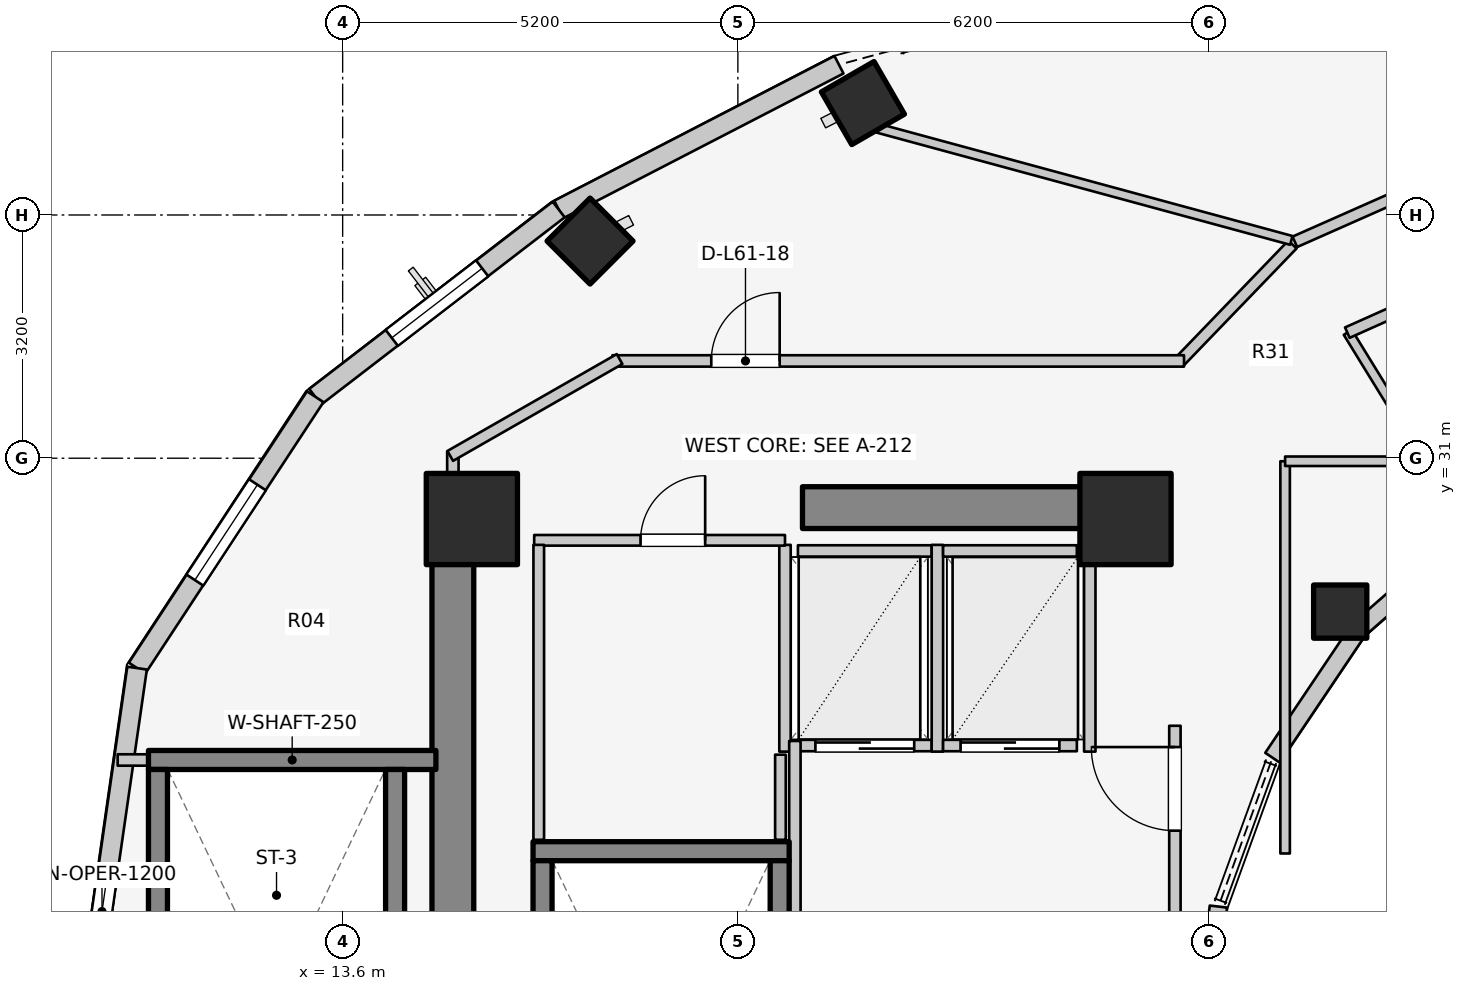
"""IFC4 building model, lengths in metres.
Left out: names, types, materials, properties, quantities, classifications, styles, units other than length and angle.
Written with IfcOpenShell. Run it as: python <this file> out.ifc"""

import sys

from ifc_helpers import new_model, si_unit, direction, frame, frame_2d, origin, origin_2d, place, context, subcontext, project, spatial, rectangle, extrude, element, fill, save


model = new_model("IFC4")
c1 = context("Model", 3, precision=1e-05, world=origin(), true_north=direction((0.0, 1.0)))
c2 = subcontext(c1, "Body", "Model", "MODEL_VIEW")
j1 = project(units=[si_unit("LENGTHUNIT", "METRE"), si_unit("PLANEANGLEUNIT", "RADIAN")], contexts=[c1])
p1 = place(None, origin())
s1 = spatial("IfcSite", under=j1, at=p1, CompositionType="ELEMENT")
p2 = place(p1, origin())
s2 = spatial("IfcBuilding", under=s1, at=p2, CompositionType="ELEMENT")
p3 = place(p2, frame((0.0, 0.0, 201.6)))
s3 = spatial("IfcBuildingStorey", under=s2, at=p3, CompositionType="ELEMENT", Elevation=201.6)
p4 = place(p3, frame((15.05, 17.05, 0.0), z_axis=(0.0, 0.0, 1.0), x_axis=(0.0, 1.0, 0.0)))
e1 = element("IfcWall", 1, at=p4, inside=s3, PredefinedType="SHEAR", context=c2, shape_type="SweptSolid", body=[
    extrude(rectangle(XDim=12.8, YDim=0.55, at=frame_2d((6.4, 0.0))), origin(), (0.0, 0.0, 1.0), 3.1),
])
p5 = place(p3, frame((19.65, 30.35, 0.0), z_axis=(0.0, 0.0, 1.0), x_axis=(1.0, 0.0, 0.0)))
e2 = element("IfcWall", 2, at=p5, inside=s3, PredefinedType="SHEAR", context=c2, shape_type="SweptSolid", body=[
    extrude(rectangle(XDim=4.5, YDim=0.55, at=frame_2d((2.25, 0.0))), origin(), (0.0, 0.0, 1.0), 3.1),
])
p6 = place(p3, frame((16.105, 25.83, 0.0), z_axis=(0.0, 0.0, 1.0), x_axis=(1.0, 0.0, 0.0)))
e3 = element("IfcWall", 3, at=p6, inside=s3, PredefinedType="SOLIDWALL", context=c2, shape_type="SweptSolid", body=[
    extrude(rectangle(XDim=3.37, YDim=0.25, at=frame_2d((1.685, 0.0))), origin(), (0.0, 0.0, 1.0), 3.1),
])
for number, where, z_axis, x_axis in (
    (4, (16.23, 17.895, 0.0), (0.0, 0.0, 1.0), (0.0, 1.0, 0.0)),
    (5, (19.35, 17.895, 0.0), (0.0, 0.0, 1.0), (0.0, 1.0, 0.0)),
):
    element("IfcWall", number, at=place(p3, frame(where, z_axis=z_axis, x_axis=x_axis)), inside=s3, PredefinedType="SOLIDWALL", context=c2, shape_type="SweptSolid", body=[
        extrude(rectangle(XDim=7.81, YDim=0.25, at=frame_2d((3.905, 0.0))), origin(), (0.0, 0.0, 1.0), 3.1),
    ])
p7 = place(p3, frame((11.045, 27.03, 0.0), z_axis=(0.0, 0.0, 1.0), x_axis=(1.0, 0.0, 0.0)))
e6 = element("IfcWall", 6, at=p7, inside=s3, PredefinedType="SOLIDWALL", context=c2, shape_type="SweptSolid", body=[
    extrude(rectangle(XDim=3.782, YDim=0.25, at=frame_2d((1.891, 0.0))), origin(), (0.0, 0.0, 1.0), 3.1),
])
for number, where, z_axis, x_axis in (
    (7, (11.17, 19.095, 0.0), (0.0, 0.0, 1.0), (0.0, 1.0, 0.0)),
    (8, (14.29, 19.095, 0.0), (0.0, 0.0, 1.0), (0.0, 1.0, 0.0)),
):
    element("IfcWall", number, at=place(p3, frame(where, z_axis=z_axis, x_axis=x_axis)), inside=s3, PredefinedType="SOLIDWALL", context=c2, shape_type="SweptSolid", body=[
        extrude(rectangle(XDim=7.81, YDim=0.25, at=frame_2d((3.905, 0.0))), origin(), (0.0, 0.0, 1.0), 3.1),
    ])
for number, where, z_axis, x_axis in (
    (9, (23.9, 30.2, 0.0), (0.0, 0.0, 1.0), (1.0, 0.0, 0.0)),
    (10, (15.3, 30.2, 0.0), (0.0, 0.0, 1.0), (1.0, 0.0, 0.0)),
):
    element("IfcColumn", number, at=place(p3, frame(where, z_axis=z_axis, x_axis=x_axis)), inside=s3, PredefinedType="COLUMN", context=c2, shape_type="SweptSolid", body=[
        extrude(rectangle(XDim=1.2, YDim=1.2, at=origin_2d()), origin(), (0.0, 0.0, 1.0), 3.1),
    ])
p8 = place(p3, frame((20.445, 35.673, 0.0), z_axis=(0.0, 0.0, 1.0), x_axis=(-0.5, 0.866025403784, 0.0)))
e11 = element("IfcColumn", 11, at=p8, inside=s3, PredefinedType="COLUMN", context=c2, shape_type="SweptSolid", body=[
    extrude(rectangle(XDim=0.8, YDim=0.8, at=origin_2d()), origin(), (0.0, 0.0, 1.0), 3.1),
])
p9 = place(p3, frame((26.725, 28.982, 0.0), z_axis=(0.0, 0.0, 1.0), x_axis=(1.0, 0.0, 0.0)))
e12 = element("IfcColumn", 12, at=p9, inside=s3, PredefinedType="COLUMN", context=c2, shape_type="SweptSolid", body=[
    extrude(rectangle(XDim=0.7, YDim=0.7, at=origin_2d()), origin(), (0.0, 0.0, 1.0), 3.1),
])
p10 = place(p3, frame((16.855, 33.857, 0.0), z_axis=(0.0, 0.0, 1.0), x_axis=(-0.707106781187, 0.707106781187, 0.0)))
e13 = element("IfcColumn", 13, at=p10, inside=s3, PredefinedType="COLUMN", context=c2, shape_type="SweptSolid", body=[
    extrude(rectangle(XDim=0.8, YDim=0.8, at=origin_2d()), origin(), (0.0, 0.0, 1.0), 3.1),
])
p11 = place(p3, frame((28.44, 30.032, 0.0), z_axis=(0.0, 0.0, 1.0), x_axis=(-0.752576694707, -0.658504607869, 0.0)))
e14 = element("IfcWall", 14, at=p11, inside=s3, PredefinedType="STANDARD", context=c2, shape_type="SweptSolid", body=[
    extrude(rectangle(XDim=1.959, YDim=0.23, at=frame_2d((0.98, 0.0))), origin(), (0.0, 0.0, 1.0), 2.16),
])
p12 = place(p3, frame((26.965, 28.742, 0.0), z_axis=(0.0, 0.0, 1.0), x_axis=(-0.558197800898, -0.829707909492, 0.0)))
e15 = element("IfcWall", 15, at=p12, inside=s3, PredefinedType="STANDARD", context=c2, shape_type="SweptSolid", body=[
    extrude(rectangle(XDim=2.027, YDim=0.23, at=frame_2d((1.013, 0.0))), origin(), (0.0, 0.0, 1.0), 2.16),
])
p13 = place(p3, frame((25.123, 25.102, 0.0), z_axis=(0.0, 0.0, 1.0), x_axis=(-0.114711713601, -0.993398823617, 0.0)))
e16 = element("IfcWall", 16, at=p13, inside=s3, PredefinedType="STANDARD", context=c2, shape_type="SweptSolid", body=[
    extrude(rectangle(XDim=2.115, YDim=0.23, at=frame_2d((1.058, 0.0))), origin(), (0.0, 0.0, 1.0), 2.84),
])
p14 = place(p3, frame((20.13, 36.177, 0.0), z_axis=(0.0, 0.0, 1.0), x_axis=(-0.88849146803, -0.458893137057, 0.0)))
e17 = element("IfcWall", 17, at=p14, inside=s3, PredefinedType="STANDARD", context=c2, shape_type="SweptSolid", body=[
    extrude(rectangle(XDim=4.15, YDim=0.26, at=frame_2d((2.075, 0.0))), origin(), (0.0, 0.0, 1.0), 2.85),
])
p15 = place(p3, frame((16.442, 34.272, 0.0), z_axis=(0.0, 0.0, 1.0), x_axis=(-0.792713817907, -0.609593965603, 0.0)))
e18 = element("IfcWall", 18, at=p15, inside=s3, PredefinedType="STANDARD", context=c2, shape_type="SweptSolid", body=[
    extrude(rectangle(XDim=4.041, YDim=0.26, at=frame_2d((2.021, 0.0))), origin(), (0.0, 0.0, 1.0), 2.85),
])
p16 = place(p15, frame((1.271, 0.0, 0.75)))
e19 = element("IfcOpeningElement", 19, at=p16, cuts=e18, PredefinedType="OPENING", context=c2, shape_type="SweptSolid", body=[
    extrude(rectangle(XDim=1.5, YDim=1.6, at=frame_2d((0.75, 0.8))), frame((0.0, 0.14, 0.0), z_axis=(0.0, -1.0, 0.0), x_axis=(1.0, 0.0, 0.0)), (0.0, 0.0, 1.0), 0.28),
])
p17 = place(p3, frame((13.239, 31.809, 0.0), z_axis=(0.0, 0.0, 1.0), x_axis=(-0.548776305075, -0.835969238064, 0.0)))
e20 = element("IfcWall", 20, at=p17, inside=s3, PredefinedType="STANDARD", context=c2, shape_type="SweptSolid", body=[
    extrude(rectangle(XDim=4.271, YDim=0.26, at=frame_2d((2.135, 0.0))), origin(), (0.0, 0.0, 1.0), 2.85),
])
p18 = place(p17, frame((1.385, 0.0, 0.75)))
e21 = element("IfcOpeningElement", 21, at=p18, cuts=e20, PredefinedType="OPENING", context=c2, shape_type="SweptSolid", body=[
    extrude(rectangle(XDim=1.5, YDim=1.6, at=frame_2d((0.75, 0.8))), frame((0.0, 0.14, 0.0), z_axis=(0.0, -1.0, 0.0), x_axis=(1.0, 0.0, 0.0)), (0.0, 0.0, 1.0), 0.28),
])
p19 = place(p3, frame((10.895, 28.239, 0.0), z_axis=(0.0, 0.0, 1.0), x_axis=(-0.142712754019, -0.989764148593, 0.0)))
e22 = element("IfcWall", 22, at=p19, inside=s3, PredefinedType="STANDARD", context=c2, shape_type="SweptSolid", body=[
    extrude(rectangle(XDim=5.293, YDim=0.26, at=frame_2d((2.646, 0.0))), origin(), (0.0, 0.0, 1.0), 2.85),
])
p20 = place(p19, frame((2.635, 0.0, 0.75)))
e23 = element("IfcOpeningElement", 23, at=p20, cuts=e22, PredefinedType="OPENING", context=c2, shape_type="SweptSolid", body=[
    extrude(rectangle(XDim=1.2, YDim=1.5, at=frame_2d((0.6, 0.75))), frame((0.0, 0.14, 0.0), z_axis=(0.0, -1.0, 0.0), x_axis=(1.0, 0.0, 0.0)), (0.0, 0.0, 1.0), 0.28),
])
p21 = place(p3, frame((19.59, 27.22, 0.0), z_axis=(0.0, 0.0, 1.0), x_axis=(1.0, 0.0, 0.0)))
e24 = element("IfcWall", 24, at=p21, inside=s3, PredefinedType="SOLIDWALL", context=c2, shape_type="SweptSolid", body=[
    extrude(rectangle(XDim=1.76, YDim=0.15, at=frame_2d((0.88, 0.0))), origin(), (0.0, 0.0, 1.0), 2.855),
])
p22 = place(p21, frame((0.23, 0.0, 0.0)))
e25 = element("IfcOpeningElement", 25, at=p22, cuts=e24, PredefinedType="OPENING", context=c2, shape_type="SweptSolid", body=[
    extrude(rectangle(XDim=1.3, YDim=2.1, at=frame_2d((0.65, 1.05))), frame((0.0, 0.085, 0.0), z_axis=(0.0, -1.0, 0.0), x_axis=(1.0, 0.0, 0.0)), (0.0, 0.0, 1.0), 0.17),
])
p23 = place(p3, frame((19.59, 29.78, 0.0), z_axis=(0.0, 0.0, 1.0), x_axis=(1.0, 0.0, 0.0)))
e26 = element("IfcWall", 26, at=p23, inside=s3, PredefinedType="SOLIDWALL", context=c2, shape_type="SweptSolid", body=[
    extrude(rectangle(XDim=1.76, YDim=0.15, at=frame_2d((0.88, 0.0))), origin(), (0.0, 0.0, 1.0), 2.855),
])
for number, where, z_axis, x_axis in (
    (27, (19.42, 27.14, 0.0), (0.0, 0.0, 1.0), (0.0, 1.0, 0.0)),
    (28, (21.425, 27.14, 0.0), (0.0, 0.0, 1.0), (0.0, 1.0, 0.0)),
):
    element("IfcWall", number, at=place(p3, frame(where, z_axis=z_axis, x_axis=x_axis)), inside=s3, PredefinedType="SOLIDWALL", context=c2, shape_type="SweptSolid", body=[
        extrude(rectangle(XDim=2.72, YDim=0.15, at=frame_2d((1.36, 0.0))), origin(), (0.0, 0.0, 1.0), 2.855),
    ])
p24 = place(p3, frame((21.5, 27.22, 0.0), z_axis=(0.0, 0.0, 1.0), x_axis=(1.0, 0.0, 0.0)))
e29 = element("IfcWall", 29, at=p24, inside=s3, PredefinedType="SOLIDWALL", context=c2, shape_type="SweptSolid", body=[
    extrude(rectangle(XDim=1.76, YDim=0.15, at=frame_2d((0.88, 0.0))), origin(), (0.0, 0.0, 1.0), 2.855),
])
p25 = place(p24, frame((0.23, 0.0, 0.0)))
e30 = element("IfcOpeningElement", 30, at=p25, cuts=e29, PredefinedType="OPENING", context=c2, shape_type="SweptSolid", body=[
    extrude(rectangle(XDim=1.3, YDim=2.1, at=frame_2d((0.65, 1.05))), frame((0.0, 0.085, 0.0), z_axis=(0.0, -1.0, 0.0), x_axis=(1.0, 0.0, 0.0)), (0.0, 0.0, 1.0), 0.17),
])
p26 = place(p3, frame((21.5, 29.78, 0.0), z_axis=(0.0, 0.0, 1.0), x_axis=(1.0, 0.0, 0.0)))
e31 = element("IfcWall", 31, at=p26, inside=s3, PredefinedType="SOLIDWALL", context=c2, shape_type="SweptSolid", body=[
    extrude(rectangle(XDim=1.76, YDim=0.15, at=frame_2d((0.88, 0.0))), origin(), (0.0, 0.0, 1.0), 2.855),
])
p27 = place(p3, frame((23.43, 27.14, 0.0), z_axis=(0.0, 0.0, 1.0), x_axis=(0.0, 1.0, 0.0)))
e32 = element("IfcWall", 32, at=p27, inside=s3, PredefinedType="SOLIDWALL", context=c2, shape_type="SweptSolid", body=[
    extrude(rectangle(XDim=2.72, YDim=0.15, at=frame_2d((1.36, 0.0))), origin(), (0.0, 0.0, 1.0), 2.855),
])
p28 = place(p3, frame((19.55, 24.08, 0.0), z_axis=(0.0, 0.0, 1.0), x_axis=(0.0, 1.0, 0.0)))
e33 = element("IfcWall", 33, at=p28, inside=s3, PredefinedType="PARTITIONING", context=c2, shape_type="SweptSolid", body=[
    extrude(rectangle(XDim=3.2, YDim=0.15, at=frame_2d((1.6, 0.0))), origin(), (0.0, 0.0, 1.0), 2.855),
])
p29 = place(p3, frame((24.55, 24.08, 0.0), z_axis=(0.0, 0.0, 1.0), x_axis=(0.0, 1.0, 0.0)))
e34 = element("IfcWall", 34, at=p29, inside=s3, PredefinedType="PARTITIONING", context=c2, shape_type="SweptSolid", body=[
    extrude(rectangle(XDim=3.4, YDim=0.15, at=frame_2d((1.7, 0.0))), origin(), (0.0, 0.0, 1.0), 2.855),
])
p30 = place(p29, frame((2.02, 0.0, 0.0)))
e35 = element("IfcOpeningElement", 35, at=p30, cuts=e34, PredefinedType="OPENING", context=c2, shape_type="SweptSolid", body=[
    extrude(rectangle(XDim=1.1, YDim=2.1, at=frame_2d((0.55, 1.05))), frame((0.0, 0.085, 0.0), z_axis=(0.0, -1.0, 0.0), x_axis=(1.0, 0.0, 0.0)), (0.0, 0.0, 1.0), 0.17),
])
p31 = place(p3, frame((16.12, 29.92, 0.0), z_axis=(0.0, 0.0, 1.0), x_axis=(1.0, 0.0, 0.0)))
e36 = element("IfcWall", 36, at=p31, inside=s3, PredefinedType="PLUMBINGWALL", context=c2, shape_type="SweptSolid", body=[
    extrude(rectangle(XDim=3.3, YDim=0.14, at=frame_2d((1.65, 0.0))), origin(), (0.0, 0.0, 1.0), 2.855),
])
p32 = place(p31, frame((1.399, 0.0, 0.0)))
e37 = element("IfcOpeningElement", 37, at=p32, cuts=e36, PredefinedType="OPENING", context=c2, shape_type="SweptSolid", body=[
    extrude(rectangle(XDim=0.85, YDim=2.05, at=frame_2d((0.425, 1.025))), frame((0.0, 0.08, 0.0), z_axis=(0.0, -1.0, 0.0), x_axis=(1.0, 0.0, 0.0)), (0.0, 0.0, 1.0), 0.16),
])
p33 = place(p3, frame((16.18, 25.98, 0.0), z_axis=(0.0, 0.0, 1.0), x_axis=(0.0, 1.0, 0.0)))
e38 = element("IfcWall", 38, at=p33, inside=s3, PredefinedType="PLUMBINGWALL", context=c2, shape_type="SweptSolid", body=[
    extrude(rectangle(XDim=3.88, YDim=0.14, at=frame_2d((1.94, 0.0))), origin(), (0.0, 0.0, 1.0), 2.855),
])
p34 = place(p3, frame((19.36, 25.98, 0.0), z_axis=(0.0, 0.0, 1.0), x_axis=(0.0, 1.0, 0.0)))
e39 = element("IfcWall", 39, at=p34, inside=s3, PredefinedType="PLUMBINGWALL", context=c2, shape_type="SweptSolid", body=[
    extrude(rectangle(XDim=1.12, YDim=0.14, at=frame_2d((0.56, 0.0))), origin(), (0.0, 0.0, 1.0), 2.855),
])
p35 = place(p3, frame((28.45, 30.015, 0.0), z_axis=(0.0, 0.0, 1.0), x_axis=(-0.523992004803, 0.851723182086, 0.0)))
e40 = element("IfcWall", 40, at=p35, inside=s3, PredefinedType="PARTITIONING", context=c2, shape_type="SweptSolid", body=[
    extrude(rectangle(XDim=3.101, YDim=0.125, at=frame_2d((1.551, 0.0))), origin(), (0.0, 0.0, 1.0), 2.376),
])
p36 = place(p3, frame((29.323, 33.771, 0.0), z_axis=(0.0, 0.0, 1.0), x_axis=(-0.913120130558, -0.407690602257, 0.0)))
e41 = element("IfcWall", 41, at=p36, inside=s3, PredefinedType="PARTITIONING", context=c2, shape_type="SweptSolid", body=[
    extrude(rectangle(XDim=2.743, YDim=0.15, at=frame_2d((1.371, 0.0))), origin(), (0.0, 0.0, 1.0), 2.376),
])
p37 = place(p36, frame((0.896, 0.0, 0.0)))
e42 = element("IfcOpeningElement", 42, at=p37, cuts=e41, PredefinedType="OPENING", context=c2, shape_type="SweptSolid", body=[
    extrude(rectangle(XDim=0.95, YDim=2.1, at=frame_2d((0.475, 1.05))), frame((0.0, 0.085, 0.0), z_axis=(0.0, -1.0, 0.0), x_axis=(1.0, 0.0, 0.0)), (0.0, 0.0, 1.0), 0.17),
])
p38 = place(p3, frame((26.0, 25.8, 0.0), z_axis=(0.0, 0.0, 1.0), x_axis=(0.0, 1.0, 0.0)))
e43 = element("IfcWall", 43, at=p38, inside=s3, PredefinedType="PARTITIONING", context=c2, shape_type="SweptSolid", body=[
    extrude(rectangle(XDim=5.16, YDim=0.125, at=frame_2d((2.58, 0.0))), origin(), (0.0, 0.0, 1.0), 2.232),
])
p39 = place(p3, frame((26.0, 30.96, 0.0), z_axis=(0.0, 0.0, 1.0), x_axis=(1.0, 0.0, 0.0)))
e44 = element("IfcWall", 44, at=p39, inside=s3, PredefinedType="PARTITIONING", context=c2, shape_type="SweptSolid", body=[
    extrude(rectangle(XDim=2.6, YDim=0.125, at=frame_2d((1.3, 0.0))), origin(), (0.0, 0.0, 1.0), 2.376),
])
p40 = place(p3, frame((10.64, 27.03, 0.0), z_axis=(0.0, 0.0, 1.0), x_axis=(1.0, 0.0, 0.0)))
e45 = element("IfcWall", 45, at=p40, inside=s3, PredefinedType="PARTITIONING", context=c2, shape_type="SweptSolid", body=[
    extrude(rectangle(XDim=0.4, YDim=0.15, at=frame_2d((0.2, 0.0))), origin(), (0.0, 0.0, 1.0), 2.855),
])
p41 = place(p3, frame((15.05, 29.8, 0.0), z_axis=(0.0, 0.0, 1.0), x_axis=(0.0, 1.0, 0.0)))
e46 = element("IfcWall", 46, at=p41, inside=s3, PredefinedType="PARTITIONING", context=c2, shape_type="SweptSolid", body=[
    extrude(rectangle(XDim=1.29, YDim=0.15, at=frame_2d((0.645, 0.0))), origin(), (0.0, 0.0, 1.0), 2.855),
])
p42 = place(p3, frame((26.097, 33.812, 0.0), z_axis=(0.0, 0.0, 1.0), x_axis=(-0.694032962553, -0.719943224768, 0.0)))
e47 = element("IfcWall", 47, at=p42, inside=s3, PredefinedType="PARTITIONING", context=c2, shape_type="SweptSolid", body=[
    extrude(rectangle(XDim=2.158, YDim=0.15, at=frame_2d((1.079, 0.0))), origin(), (0.0, 0.0, 1.0), 2.376),
])
p43 = place(p3, frame((17.15, 32.28, 0.0), z_axis=(0.0, 0.0, 1.0), x_axis=(1.0, 0.0, 0.0)))
e48 = element("IfcWall", 48, at=p43, inside=s3, PredefinedType="PARTITIONING", context=c2, shape_type="SweptSolid", body=[
    extrude(rectangle(XDim=7.52, YDim=0.15, at=frame_2d((3.76, 0.0))), origin(), (0.0, 0.0, 1.0), 2.376),
])
p44 = place(p43, frame((1.3, 0.0, 0.0)))
e49 = element("IfcOpeningElement", 49, at=p44, cuts=e48, PredefinedType="OPENING", context=c2, shape_type="SweptSolid", body=[
    extrude(rectangle(XDim=0.9, YDim=2.1, at=frame_2d((0.45, 1.05))), frame((0.0, 0.085, 0.0), z_axis=(0.0, -1.0, 0.0), x_axis=(1.0, 0.0, 0.0)), (0.0, 0.0, 1.0), 0.17),
])
p45 = place(p3, frame((17.243, 32.305, 0.0), z_axis=(0.0, 0.0, 1.0), x_axis=(-0.867991349648, -0.496579315857, 0.0)))
e50 = element("IfcWall", 50, at=p45, inside=s3, PredefinedType="PARTITIONING", context=c2, shape_type="SweptSolid", body=[
    extrude(rectangle(XDim=2.567, YDim=0.15, at=frame_2d((1.283, 0.0))), origin(), (0.0, 0.0, 1.0), 2.22),
])
p46 = place(p3, frame((26.082, 33.866, 0.0), z_axis=(0.0, 0.0, 1.0), x_axis=(-0.965109390289, 0.261847025523, 0.0)))
e51 = element("IfcWall", 51, at=p46, inside=s3, PredefinedType="MOVABLE", context=c2, shape_type="SweptSolid", body=[
    extrude(rectangle(XDim=5.644, YDim=0.12, at=frame_2d((2.822, 0.0))), origin(), (0.0, 0.0, 1.0), 2.376),
])
p47 = place(p3, frame((28.966, 35.104, 0.0), z_axis=(0.0, 0.0, 1.0), x_axis=(-0.914384748819, -0.404846305563, 0.0)))
e52 = element("IfcWall", 52, at=p47, inside=s3, PredefinedType="PARTITIONING", context=c2, shape_type="SweptSolid", body=[
    extrude(rectangle(XDim=3.104, YDim=0.15, at=frame_2d((1.552, 0.0))), origin(), (0.0, 0.0, 1.0), 2.376),
])
p48 = place(p16, origin())
e53 = element("IfcWindow", 53, at=p48, inside=s3, PartitioningType="SINGLE_PANEL", PredefinedType="WINDOW", context=c2, shape_type="SweptSolid", body=[
    extrude(rectangle(XDim=1.5, YDim=1.6, at=frame_2d((0.75, 0.8))), frame((0.0, 0.03, 0.0), z_axis=(0.0, -1.0, 0.0), x_axis=(1.0, 0.0, 0.0)), (0.0, 0.0, 1.0), 0.06),
])
fill(e19, e53)
p49 = place(p18, origin())
e54 = element("IfcWindow", 54, at=p49, inside=s3, PartitioningType="SINGLE_PANEL", PredefinedType="WINDOW", context=c2, shape_type="SweptSolid", body=[
    extrude(rectangle(XDim=1.5, YDim=1.6, at=frame_2d((0.75, 0.8))), frame((0.0, 0.03, 0.0), z_axis=(0.0, -1.0, 0.0), x_axis=(1.0, 0.0, 0.0)), (0.0, 0.0, 1.0), 0.06),
])
fill(e21, e54)
p50 = place(p20, origin())
e55 = element("IfcWindow", 55, at=p50, inside=s3, PartitioningType="SINGLE_PANEL", PredefinedType="WINDOW", context=c2, shape_type="SweptSolid", body=[
    extrude(rectangle(XDim=1.2, YDim=1.5, at=frame_2d((0.6, 0.75))), frame((0.0, 0.03, 0.0), z_axis=(0.0, -1.0, 0.0), x_axis=(1.0, 0.0, 0.0)), (0.0, 0.0, 1.0), 0.06),
])
fill(e23, e55)
p51 = place(p22, origin())
e56 = element("IfcDoor", 56, at=p51, inside=s3, OperationType="DOUBLE_DOOR_SLIDING", PredefinedType="DOOR", context=c2, shape_type="SweptSolid", body=[
    extrude(rectangle(XDim=1.3, YDim=2.1, at=frame_2d((0.65, 1.05))), frame((0.0, 0.025, 0.0), z_axis=(0.0, -1.0, 0.0), x_axis=(1.0, 0.0, 0.0)), (0.0, 0.0, 1.0), 0.05),
])
fill(e25, e56)
p52 = place(p25, origin())
e57 = element("IfcDoor", 57, at=p52, inside=s3, OperationType="DOUBLE_DOOR_SLIDING", PredefinedType="DOOR", context=c2, shape_type="SweptSolid", body=[
    extrude(rectangle(XDim=1.3, YDim=2.1, at=frame_2d((0.65, 1.05))), frame((0.0, 0.025, 0.0), z_axis=(0.0, -1.0, 0.0), x_axis=(1.0, 0.0, 0.0)), (0.0, 0.0, 1.0), 0.05),
])
fill(e30, e57)
p53 = place(p30, origin())
e58 = element("IfcDoor", 58, at=p53, inside=s3, OperationType="SINGLE_SWING_RIGHT", PredefinedType="DOOR", context=c2, shape_type="SweptSolid", body=[
    extrude(rectangle(XDim=1.1, YDim=2.1, at=frame_2d((0.55, 1.05))), frame((0.0, 0.025, 0.0), z_axis=(0.0, -1.0, 0.0), x_axis=(1.0, 0.0, 0.0)), (0.0, 0.0, 1.0), 0.05),
])
fill(e35, e58)
p54 = place(p32, origin())
e59 = element("IfcDoor", 59, at=p54, inside=s3, OperationType="SINGLE_SWING_RIGHT", PredefinedType="DOOR", context=c2, shape_type="SweptSolid", body=[
    extrude(rectangle(XDim=0.85, YDim=2.05, at=frame_2d((0.425, 1.025))), frame((0.0, 0.025, 0.0), z_axis=(0.0, -1.0, 0.0), x_axis=(1.0, 0.0, 0.0)), (0.0, 0.0, 1.0), 0.05),
])
fill(e37, e59)
p55 = place(p44, origin())
e60 = element("IfcDoor", 60, at=p55, inside=s3, OperationType="SINGLE_SWING_RIGHT", PredefinedType="DOOR", context=c2, shape_type="SweptSolid", body=[
    extrude(rectangle(XDim=0.9, YDim=2.1, at=frame_2d((0.45, 1.05))), frame((0.0, 0.025, 0.0), z_axis=(0.0, -1.0, 0.0), x_axis=(1.0, 0.0, 0.0)), (0.0, 0.0, 1.0), 0.05),
])
fill(e49, e60)
save(model, sys.argv[1])
